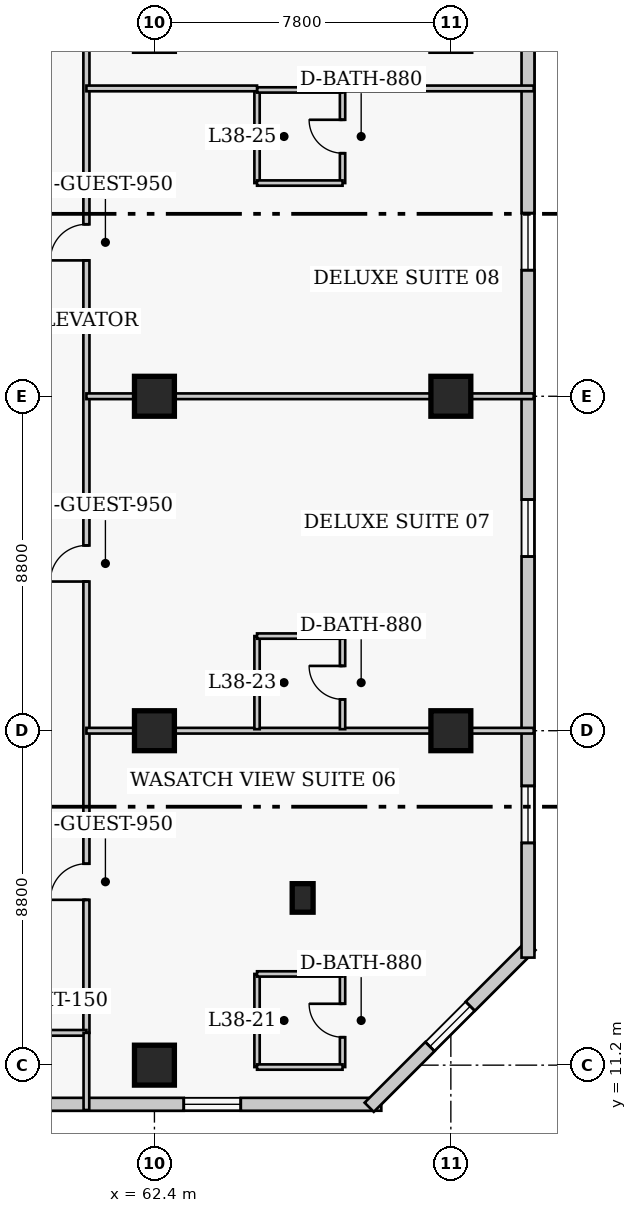
"""IFC4 building model, lengths in metres.
Left out: names, types, materials, properties, quantities, classifications, styles, units other than length and angle.
Written with IfcOpenShell. Run it as: python <this file> out.ifc"""

import sys

from ifc_helpers import new_model, si_unit, direction, frame, frame_2d, origin, origin_2d, place, context, subcontext, project, spatial, rectangle, extrude, element, fill, save


model = new_model("IFC4")
c1 = context("Model", 3, precision=1e-05, world=origin(), true_north=direction((0.0, 1.0)))
c2 = subcontext(c1, "Body", "Model", "MODEL_VIEW")
j1 = project(units=[si_unit("LENGTHUNIT", "METRE"), si_unit("PLANEANGLEUNIT", "RADIAN")], contexts=[c1])
p1 = place(None, origin())
s1 = spatial("IfcSite", under=j1, at=p1, CompositionType="ELEMENT")
p2 = place(p1, origin())
s2 = spatial("IfcBuilding", under=s1, at=p2, CompositionType="ELEMENT")
p3 = place(p2, frame((0.0, 0.0, 153.6)))
s3 = spatial("IfcBuildingStorey", under=s2, at=p3, CompositionType="ELEMENT", Elevation=153.6)
for number, where, z_axis, x_axis in (
    (1, (62.4, 11.2, 0.0), (0.0, 0.0, 1.0), (1.0, 0.0, 0.0)),
    (2, (62.4, 20.0, 0.0), (0.0, 0.0, 1.0), (1.0, 0.0, 0.0)),
    (3, (62.4, 28.8, 0.0), (0.0, 0.0, 1.0), (1.0, 0.0, 0.0)),
    (4, (70.2, 20.0, 0.0), (0.0, 0.0, 1.0), (1.0, 0.0, 0.0)),
    (5, (70.2, 28.8, 0.0), (0.0, 0.0, 1.0), (1.0, 0.0, 0.0)),
):
    element("IfcColumn", number, at=place(p3, frame(where, z_axis=z_axis, x_axis=x_axis)), inside=s3, PredefinedType="COLUMN", context=c2, shape_type="SweptSolid", body=[
        extrude(rectangle(XDim=1.05, YDim=1.05, at=origin_2d()), origin(), (0.0, 0.0, 1.0), 3.8),
    ])
p4 = place(p3, frame((66.3, 15.6, 0.0), z_axis=(0.0, 0.0, 1.0), x_axis=(1.0, 0.0, 0.0)))
e6 = element("IfcColumn", 6, at=p4, inside=s3, PredefinedType="PILASTER", context=c2, shape_type="SweptSolid", body=[
    extrude(rectangle(XDim=0.55, YDim=0.75, at=origin_2d()), origin(), (0.0, 0.0, 1.0), 3.8),
])
p5 = place(p3, frame((41.68, 10.17, 0.0), z_axis=(0.0, 0.0, 1.0), x_axis=(1.0, 0.0, 0.0)))
e7 = element("IfcWall", 7, at=p5, inside=s3, PredefinedType="SOLIDWALL", context=c2, shape_type="SweptSolid", body=[
    extrude(rectangle(XDim=26.69, YDim=0.34, at=frame_2d((13.345, 0.0))), origin(), (0.0, 0.0, 1.0), 3.55),
])
p6 = place(p5, frame((2.548, 0.0, 0.85)))
e8 = element("IfcOpeningElement", 8, at=p6, cuts=e7, PredefinedType="OPENING", context=c2, shape_type="SweptSolid", body=[
    extrude(rectangle(XDim=1.5, YDim=1.75, at=frame_2d((0.75, 0.875))), frame((0.0, 0.18, 0.0), z_axis=(0.0, -1.0, 0.0), x_axis=(1.0, 0.0, 0.0)), (0.0, 0.0, 1.0), 0.36),
])
p7 = place(p5, frame((13.745, 0.0, 0.85)))
e9 = element("IfcOpeningElement", 9, at=p7, cuts=e7, PredefinedType="OPENING", context=c2, shape_type="SweptSolid", body=[
    extrude(rectangle(XDim=1.5, YDim=1.75, at=frame_2d((0.75, 0.875))), frame((0.0, 0.18, 0.0), z_axis=(0.0, -1.0, 0.0), x_axis=(1.0, 0.0, 0.0)), (0.0, 0.0, 1.0), 0.36),
])
p8 = place(p5, frame((21.492, 0.0, 0.85)))
e10 = element("IfcOpeningElement", 10, at=p8, cuts=e7, PredefinedType="OPENING", context=c2, shape_type="SweptSolid", body=[
    extrude(rectangle(XDim=1.5, YDim=1.75, at=frame_2d((0.75, 0.875))), frame((0.0, 0.18, 0.0), z_axis=(0.0, -1.0, 0.0), x_axis=(1.0, 0.0, 0.0)), (0.0, 0.0, 1.0), 0.36),
])
p9 = place(p3, frame((68.052, 10.092, 0.0), z_axis=(0.0, 0.0, 1.0), x_axis=(0.707106781187, 0.707106781187, 0.0)))
e11 = element("IfcWall", 11, at=p9, inside=s3, PredefinedType="SOLIDWALL", context=c2, shape_type="SweptSolid", body=[
    extrude(rectangle(XDim=6.02, YDim=0.34, at=frame_2d((3.01, 0.0))), origin(), (0.0, 0.0, 1.0), 3.55),
])
p10 = place(p9, frame((2.26, 0.0, 0.85)))
e12 = element("IfcOpeningElement", 12, at=p10, cuts=e11, PredefinedType="OPENING", context=c2, shape_type="SweptSolid", body=[
    extrude(rectangle(XDim=1.5, YDim=1.75, at=frame_2d((0.75, 0.875))), frame((0.0, 0.18, 0.0), z_axis=(0.0, -1.0, 0.0), x_axis=(1.0, 0.0, 0.0)), (0.0, 0.0, 1.0), 0.36),
])
p11 = place(p3, frame((72.23, 14.03, 0.0), z_axis=(0.0, 0.0, 1.0), x_axis=(0.0, 1.0, 0.0)))
e13 = element("IfcWall", 13, at=p11, inside=s3, PredefinedType="SOLIDWALL", context=c2, shape_type="SweptSolid", body=[
    extrude(rectangle(XDim=30.14, YDim=0.34, at=frame_2d((15.07, 0.0))), origin(), (0.0, 0.0, 1.0), 3.55),
])
p12 = place(p11, frame((3.018, 0.0, 0.85)))
e14 = element("IfcOpeningElement", 14, at=p12, cuts=e13, PredefinedType="OPENING", context=c2, shape_type="SweptSolid", body=[
    extrude(rectangle(XDim=1.5, YDim=1.75, at=frame_2d((0.75, 0.875))), frame((0.0, 0.18, 0.0), z_axis=(0.0, -1.0, 0.0), x_axis=(1.0, 0.0, 0.0)), (0.0, 0.0, 1.0), 0.36),
])
p13 = place(p11, frame((10.552, 0.0, 0.85)))
e15 = element("IfcOpeningElement", 15, at=p13, cuts=e13, PredefinedType="OPENING", context=c2, shape_type="SweptSolid", body=[
    extrude(rectangle(XDim=1.5, YDim=1.75, at=frame_2d((0.75, 0.875))), frame((0.0, 0.18, 0.0), z_axis=(0.0, -1.0, 0.0), x_axis=(1.0, 0.0, 0.0)), (0.0, 0.0, 1.0), 0.36),
])
p14 = place(p11, frame((18.087, 0.0, 0.85)))
e16 = element("IfcOpeningElement", 16, at=p14, cuts=e13, PredefinedType="OPENING", context=c2, shape_type="SweptSolid", body=[
    extrude(rectangle(XDim=1.5, YDim=1.75, at=frame_2d((0.75, 0.875))), frame((0.0, 0.18, 0.0), z_axis=(0.0, -1.0, 0.0), x_axis=(1.0, 0.0, 0.0)), (0.0, 0.0, 1.0), 0.36),
])
p15 = place(p11, frame((25.623, 0.0, 0.85)))
e17 = element("IfcOpeningElement", 17, at=p15, cuts=e13, PredefinedType="OPENING", context=c2, shape_type="SweptSolid", body=[
    extrude(rectangle(XDim=1.5, YDim=1.75, at=frame_2d((0.75, 0.875))), frame((0.0, 0.18, 0.0), z_axis=(0.0, -1.0, 0.0), x_axis=(1.0, 0.0, 0.0)), (0.0, 0.0, 1.0), 0.36),
])
p16 = place(p3, frame((60.61, 12.05, 0.0), z_axis=(0.0, 0.0, 1.0), x_axis=(0.0, 1.0, 0.0)))
e18 = element("IfcWall", 18, at=p16, inside=s3, PredefinedType="PARTITIONING", context=c2, shape_type="SweptSolid", body=[
    extrude(rectangle(XDim=28.6, YDim=0.16, at=frame_2d((14.3, 0.0))), origin(), (0.0, 0.0, 1.0), 3.55),
])
p17 = place(p16, frame((3.5, 0.0, 0.0)))
e19 = element("IfcOpeningElement", 19, at=p17, cuts=e18, PredefinedType="OPENING", context=c2, shape_type="SweptSolid", body=[
    extrude(rectangle(XDim=0.95, YDim=2.1, at=frame_2d((0.475, 1.05))), frame((0.0, 0.09, 0.0), z_axis=(0.0, -1.0, 0.0), x_axis=(1.0, 0.0, 0.0)), (0.0, 0.0, 1.0), 0.18),
])
p18 = place(p16, frame((11.875, 0.0, 0.0)))
e20 = element("IfcOpeningElement", 20, at=p18, cuts=e18, PredefinedType="OPENING", context=c2, shape_type="SweptSolid", body=[
    extrude(rectangle(XDim=0.95, YDim=2.1, at=frame_2d((0.475, 1.05))), frame((0.0, 0.09, 0.0), z_axis=(0.0, -1.0, 0.0), x_axis=(1.0, 0.0, 0.0)), (0.0, 0.0, 1.0), 0.18),
])
p19 = place(p16, frame((20.325, 0.0, 0.0)))
e21 = element("IfcOpeningElement", 21, at=p19, cuts=e18, PredefinedType="OPENING", context=c2, shape_type="SweptSolid", body=[
    extrude(rectangle(XDim=0.95, YDim=2.1, at=frame_2d((0.475, 1.05))), frame((0.0, 0.09, 0.0), z_axis=(0.0, -1.0, 0.0), x_axis=(1.0, 0.0, 0.0)), (0.0, 0.0, 1.0), 0.18),
])
p20 = place(p16, frame((27.16, 0.0, 0.0)))
e22 = element("IfcOpeningElement", 22, at=p20, cuts=e18, PredefinedType="OPENING", context=c2, shape_type="SweptSolid", body=[
    extrude(rectangle(XDim=1.0, YDim=2.15, at=frame_2d((0.5, 1.075))), frame((0.0, 0.09, 0.0), z_axis=(0.0, -1.0, 0.0), x_axis=(1.0, 0.0, 0.0)), (0.0, 0.0, 1.0), 0.18),
])
p21 = place(p3, frame((58.39, 12.05, 0.0), z_axis=(0.0, 0.0, 1.0), x_axis=(1.0, 0.0, 0.0)))
e23 = element("IfcWall", 23, at=p21, inside=s3, PredefinedType="PARTITIONING", context=c2, shape_type="SweptSolid", body=[
    extrude(rectangle(XDim=2.22, YDim=0.15, at=frame_2d((1.11, 0.0))), origin(), (0.0, 0.0, 1.0), 3.55),
])
p22 = place(p3, frame((60.61, 10.02, 0.0), z_axis=(0.0, 0.0, 1.0), x_axis=(0.0, 1.0, 0.0)))
e24 = element("IfcWall", 24, at=p22, inside=s3, PredefinedType="PARTITIONING", context=c2, shape_type="SweptSolid", body=[
    extrude(rectangle(XDim=2.03, YDim=0.15, at=frame_2d((1.015, 0.0))), origin(), (0.0, 0.0, 1.0), 3.55),
])
p23 = place(p3, frame((65.1, 11.15, 0.0), z_axis=(0.0, 0.0, 1.0), x_axis=(0.0, 1.0, 0.0)))
e25 = element("IfcWall", 25, at=p23, inside=s3, PredefinedType="PLUMBINGWALL", context=c2, shape_type="SweptSolid", body=[
    extrude(rectangle(XDim=2.45, YDim=0.14, at=frame_2d((1.225, 0.0))), origin(), (0.0, 0.0, 1.0), 3.55),
])
p24 = place(p3, frame((67.35, 11.15, 0.0), z_axis=(0.0, 0.0, 1.0), x_axis=(0.0, 1.0, 0.0)))
e26 = element("IfcWall", 26, at=p24, inside=s3, PredefinedType="PLUMBINGWALL", context=c2, shape_type="SweptSolid", body=[
    extrude(rectangle(XDim=2.45, YDim=0.14, at=frame_2d((1.225, 0.0))), origin(), (0.0, 0.0, 1.0), 3.55),
])
p25 = place(p24, frame((0.785, 0.0, 0.0)))
e27 = element("IfcOpeningElement", 27, at=p25, cuts=e26, PredefinedType="OPENING", context=c2, shape_type="SweptSolid", body=[
    extrude(rectangle(XDim=0.88, YDim=2.05, at=frame_2d((0.44, 1.025))), frame((0.0, 0.08, 0.0), z_axis=(0.0, -1.0, 0.0), x_axis=(1.0, 0.0, 0.0)), (0.0, 0.0, 1.0), 0.16),
])
for number, where, z_axis, x_axis in (
    (28, (65.1, 11.15, 0.0), (0.0, 0.0, 1.0), (1.0, 0.0, 0.0)),
    (29, (65.1, 13.6, 0.0), (0.0, 0.0, 1.0), (1.0, 0.0, 0.0)),
):
    element("IfcWall", number, at=place(p3, frame(where, z_axis=z_axis, x_axis=x_axis)), inside=s3, PredefinedType="PLUMBINGWALL", context=c2, shape_type="SweptSolid", body=[
        extrude(rectangle(XDim=2.25, YDim=0.14, at=frame_2d((1.125, 0.0))), origin(), (0.0, 0.0, 1.0), 3.55),
    ])
p26 = place(p3, frame((60.61, 20.0, 0.0), z_axis=(0.0, 0.0, 1.0), x_axis=(1.0, 0.0, 0.0)))
e30 = element("IfcWall", 30, at=p26, inside=s3, PredefinedType="PARTITIONING", context=c2, shape_type="SweptSolid", body=[
    extrude(rectangle(XDim=11.77, YDim=0.15, at=frame_2d((5.885, 0.0))), origin(), (0.0, 0.0, 1.0), 2.778),
])
p27 = place(p3, frame((65.1, 20.04, 0.0), z_axis=(0.0, 0.0, 1.0), x_axis=(0.0, 1.0, 0.0)))
e31 = element("IfcWall", 31, at=p27, inside=s3, PredefinedType="PLUMBINGWALL", context=c2, shape_type="SweptSolid", body=[
    extrude(rectangle(XDim=2.45, YDim=0.14, at=frame_2d((1.225, 0.0))), origin(), (0.0, 0.0, 1.0), 3.55),
])
p28 = place(p3, frame((67.35, 20.04, 0.0), z_axis=(0.0, 0.0, 1.0), x_axis=(0.0, 1.0, 0.0)))
e32 = element("IfcWall", 32, at=p28, inside=s3, PredefinedType="PLUMBINGWALL", context=c2, shape_type="SweptSolid", body=[
    extrude(rectangle(XDim=2.45, YDim=0.14, at=frame_2d((1.225, 0.0))), origin(), (0.0, 0.0, 1.0), 3.55),
])
p29 = place(p28, frame((0.785, 0.0, 0.0)))
e33 = element("IfcOpeningElement", 33, at=p29, cuts=e32, PredefinedType="OPENING", context=c2, shape_type="SweptSolid", body=[
    extrude(rectangle(XDim=0.88, YDim=2.05, at=frame_2d((0.44, 1.025))), frame((0.0, 0.08, 0.0), z_axis=(0.0, -1.0, 0.0), x_axis=(1.0, 0.0, 0.0)), (0.0, 0.0, 1.0), 0.16),
])
p30 = place(p3, frame((65.1, 22.49, 0.0), z_axis=(0.0, 0.0, 1.0), x_axis=(1.0, 0.0, 0.0)))
e34 = element("IfcWall", 34, at=p30, inside=s3, PredefinedType="PLUMBINGWALL", context=c2, shape_type="SweptSolid", body=[
    extrude(rectangle(XDim=2.25, YDim=0.14, at=frame_2d((1.125, 0.0))), origin(), (0.0, 0.0, 1.0), 3.55),
])
p31 = place(p3, frame((60.61, 28.8, 0.0), z_axis=(0.0, 0.0, 1.0), x_axis=(1.0, 0.0, 0.0)))
e35 = element("IfcWall", 35, at=p31, inside=s3, PredefinedType="PARTITIONING", context=c2, shape_type="SweptSolid", body=[
    extrude(rectangle(XDim=11.77, YDim=0.15, at=frame_2d((5.885, 0.0))), origin(), (0.0, 0.0, 1.0), 2.778),
])
p32 = place(p3, frame((65.1, 34.41, 0.0), z_axis=(0.0, 0.0, 1.0), x_axis=(0.0, 1.0, 0.0)))
e36 = element("IfcWall", 36, at=p32, inside=s3, PredefinedType="PLUMBINGWALL", context=c2, shape_type="SweptSolid", body=[
    extrude(rectangle(XDim=2.45, YDim=0.14, at=frame_2d((1.225, 0.0))), origin(), (0.0, 0.0, 1.0), 3.55),
])
p33 = place(p3, frame((67.35, 34.41, 0.0), z_axis=(0.0, 0.0, 1.0), x_axis=(0.0, 1.0, 0.0)))
e37 = element("IfcWall", 37, at=p33, inside=s3, PredefinedType="PLUMBINGWALL", context=c2, shape_type="SweptSolid", body=[
    extrude(rectangle(XDim=2.45, YDim=0.14, at=frame_2d((1.225, 0.0))), origin(), (0.0, 0.0, 1.0), 3.55),
])
p34 = place(p33, frame((0.785, 0.0, 0.0)))
e38 = element("IfcOpeningElement", 38, at=p34, cuts=e37, PredefinedType="OPENING", context=c2, shape_type="SweptSolid", body=[
    extrude(rectangle(XDim=0.88, YDim=2.05, at=frame_2d((0.44, 1.025))), frame((0.0, 0.08, 0.0), z_axis=(0.0, -1.0, 0.0), x_axis=(1.0, 0.0, 0.0)), (0.0, 0.0, 1.0), 0.16),
])
for number, where, z_axis, x_axis in (
    (39, (65.1, 34.41, 0.0), (0.0, 0.0, 1.0), (1.0, 0.0, 0.0)),
    (40, (65.1, 36.86, 0.0), (0.0, 0.0, 1.0), (1.0, 0.0, 0.0)),
):
    element("IfcWall", number, at=place(p3, frame(where, z_axis=z_axis, x_axis=x_axis)), inside=s3, PredefinedType="PLUMBINGWALL", context=c2, shape_type="SweptSolid", body=[
        extrude(rectangle(XDim=2.25, YDim=0.14, at=frame_2d((1.125, 0.0))), origin(), (0.0, 0.0, 1.0), 3.55),
    ])
p35 = place(p3, frame((60.61, 36.9, 0.0), z_axis=(0.0, 0.0, 1.0), x_axis=(1.0, 0.0, 0.0)))
e41 = element("IfcWall", 41, at=p35, inside=s3, PredefinedType="PARTITIONING", context=c2, shape_type="SweptSolid", body=[
    extrude(rectangle(XDim=4.49, YDim=0.15, at=frame_2d((2.245, 0.0))), origin(), (0.0, 0.0, 1.0), 3.55),
])
p36 = place(p3, frame((67.35, 36.9, 0.0), z_axis=(0.0, 0.0, 1.0), x_axis=(1.0, 0.0, 0.0)))
e42 = element("IfcWall", 42, at=p36, inside=s3, PredefinedType="PARTITIONING", context=c2, shape_type="SweptSolid", body=[
    extrude(rectangle(XDim=5.03, YDim=0.15, at=frame_2d((2.515, 0.0))), origin(), (0.0, 0.0, 1.0), 3.55),
])
p37 = place(p8, origin())
e43 = element("IfcWindow", 43, at=p37, inside=s3, PartitioningType="SINGLE_PANEL", PredefinedType="WINDOW", context=c2, shape_type="SweptSolid", body=[
    extrude(rectangle(XDim=1.5, YDim=1.75, at=frame_2d((0.75, 0.875))), frame((0.0, 0.03, 0.0), z_axis=(0.0, -1.0, 0.0), x_axis=(1.0, 0.0, 0.0)), (0.0, 0.0, 1.0), 0.06),
])
fill(e10, e43)
p38 = place(p10, origin())
e44 = element("IfcWindow", 44, at=p38, inside=s3, PartitioningType="SINGLE_PANEL", PredefinedType="WINDOW", context=c2, shape_type="SweptSolid", body=[
    extrude(rectangle(XDim=1.5, YDim=1.75, at=frame_2d((0.75, 0.875))), frame((0.0, 0.03, 0.0), z_axis=(0.0, -1.0, 0.0), x_axis=(1.0, 0.0, 0.0)), (0.0, 0.0, 1.0), 0.06),
])
fill(e12, e44)
p39 = place(p12, origin())
e45 = element("IfcWindow", 45, at=p39, inside=s3, PartitioningType="SINGLE_PANEL", PredefinedType="WINDOW", context=c2, shape_type="SweptSolid", body=[
    extrude(rectangle(XDim=1.5, YDim=1.75, at=frame_2d((0.75, 0.875))), frame((0.0, 0.03, 0.0), z_axis=(0.0, -1.0, 0.0), x_axis=(1.0, 0.0, 0.0)), (0.0, 0.0, 1.0), 0.06),
])
fill(e14, e45)
p40 = place(p13, origin())
e46 = element("IfcWindow", 46, at=p40, inside=s3, PartitioningType="SINGLE_PANEL", PredefinedType="WINDOW", context=c2, shape_type="SweptSolid", body=[
    extrude(rectangle(XDim=1.5, YDim=1.75, at=frame_2d((0.75, 0.875))), frame((0.0, 0.03, 0.0), z_axis=(0.0, -1.0, 0.0), x_axis=(1.0, 0.0, 0.0)), (0.0, 0.0, 1.0), 0.06),
])
fill(e15, e46)
p41 = place(p14, origin())
e47 = element("IfcWindow", 47, at=p41, inside=s3, PartitioningType="SINGLE_PANEL", PredefinedType="WINDOW", context=c2, shape_type="SweptSolid", body=[
    extrude(rectangle(XDim=1.5, YDim=1.75, at=frame_2d((0.75, 0.875))), frame((0.0, 0.03, 0.0), z_axis=(0.0, -1.0, 0.0), x_axis=(1.0, 0.0, 0.0)), (0.0, 0.0, 1.0), 0.06),
])
fill(e16, e47)
p42 = place(p25, origin())
e48 = element("IfcDoor", 48, at=p42, inside=s3, OperationType="SINGLE_SWING_RIGHT", PredefinedType="DOOR", context=c2, shape_type="SweptSolid", body=[
    extrude(rectangle(XDim=0.88, YDim=2.05, at=frame_2d((0.44, 1.025))), frame((0.0, 0.025, 0.0), z_axis=(0.0, -1.0, 0.0), x_axis=(1.0, 0.0, 0.0)), (0.0, 0.0, 1.0), 0.05),
])
fill(e27, e48)
p43 = place(p17, origin())
e49 = element("IfcDoor", 49, at=p43, inside=s3, OperationType="SINGLE_SWING_LEFT", PredefinedType="DOOR", context=c2, shape_type="SweptSolid", body=[
    extrude(rectangle(XDim=0.95, YDim=2.1, at=frame_2d((0.475, 1.05))), frame((0.0, 0.025, 0.0), z_axis=(0.0, -1.0, 0.0), x_axis=(1.0, 0.0, 0.0)), (0.0, 0.0, 1.0), 0.05),
])
fill(e19, e49)
p44 = place(p29, origin())
e50 = element("IfcDoor", 50, at=p44, inside=s3, OperationType="SINGLE_SWING_RIGHT", PredefinedType="DOOR", context=c2, shape_type="SweptSolid", body=[
    extrude(rectangle(XDim=0.88, YDim=2.05, at=frame_2d((0.44, 1.025))), frame((0.0, 0.025, 0.0), z_axis=(0.0, -1.0, 0.0), x_axis=(1.0, 0.0, 0.0)), (0.0, 0.0, 1.0), 0.05),
])
fill(e33, e50)
p45 = place(p18, origin())
e51 = element("IfcDoor", 51, at=p45, inside=s3, OperationType="SINGLE_SWING_LEFT", PredefinedType="DOOR", context=c2, shape_type="SweptSolid", body=[
    extrude(rectangle(XDim=0.95, YDim=2.1, at=frame_2d((0.475, 1.05))), frame((0.0, 0.025, 0.0), z_axis=(0.0, -1.0, 0.0), x_axis=(1.0, 0.0, 0.0)), (0.0, 0.0, 1.0), 0.05),
])
fill(e20, e51)
p46 = place(p34, origin())
e52 = element("IfcDoor", 52, at=p46, inside=s3, OperationType="SINGLE_SWING_RIGHT", PredefinedType="DOOR", context=c2, shape_type="SweptSolid", body=[
    extrude(rectangle(XDim=0.88, YDim=2.05, at=frame_2d((0.44, 1.025))), frame((0.0, 0.025, 0.0), z_axis=(0.0, -1.0, 0.0), x_axis=(1.0, 0.0, 0.0)), (0.0, 0.0, 1.0), 0.05),
])
fill(e38, e52)
p47 = place(p19, origin())
e53 = element("IfcDoor", 53, at=p47, inside=s3, OperationType="SINGLE_SWING_LEFT", PredefinedType="DOOR", context=c2, shape_type="SweptSolid", body=[
    extrude(rectangle(XDim=0.95, YDim=2.1, at=frame_2d((0.475, 1.05))), frame((0.0, 0.025, 0.0), z_axis=(0.0, -1.0, 0.0), x_axis=(1.0, 0.0, 0.0)), (0.0, 0.0, 1.0), 0.05),
])
fill(e21, e53)
save(model, sys.argv[1])
